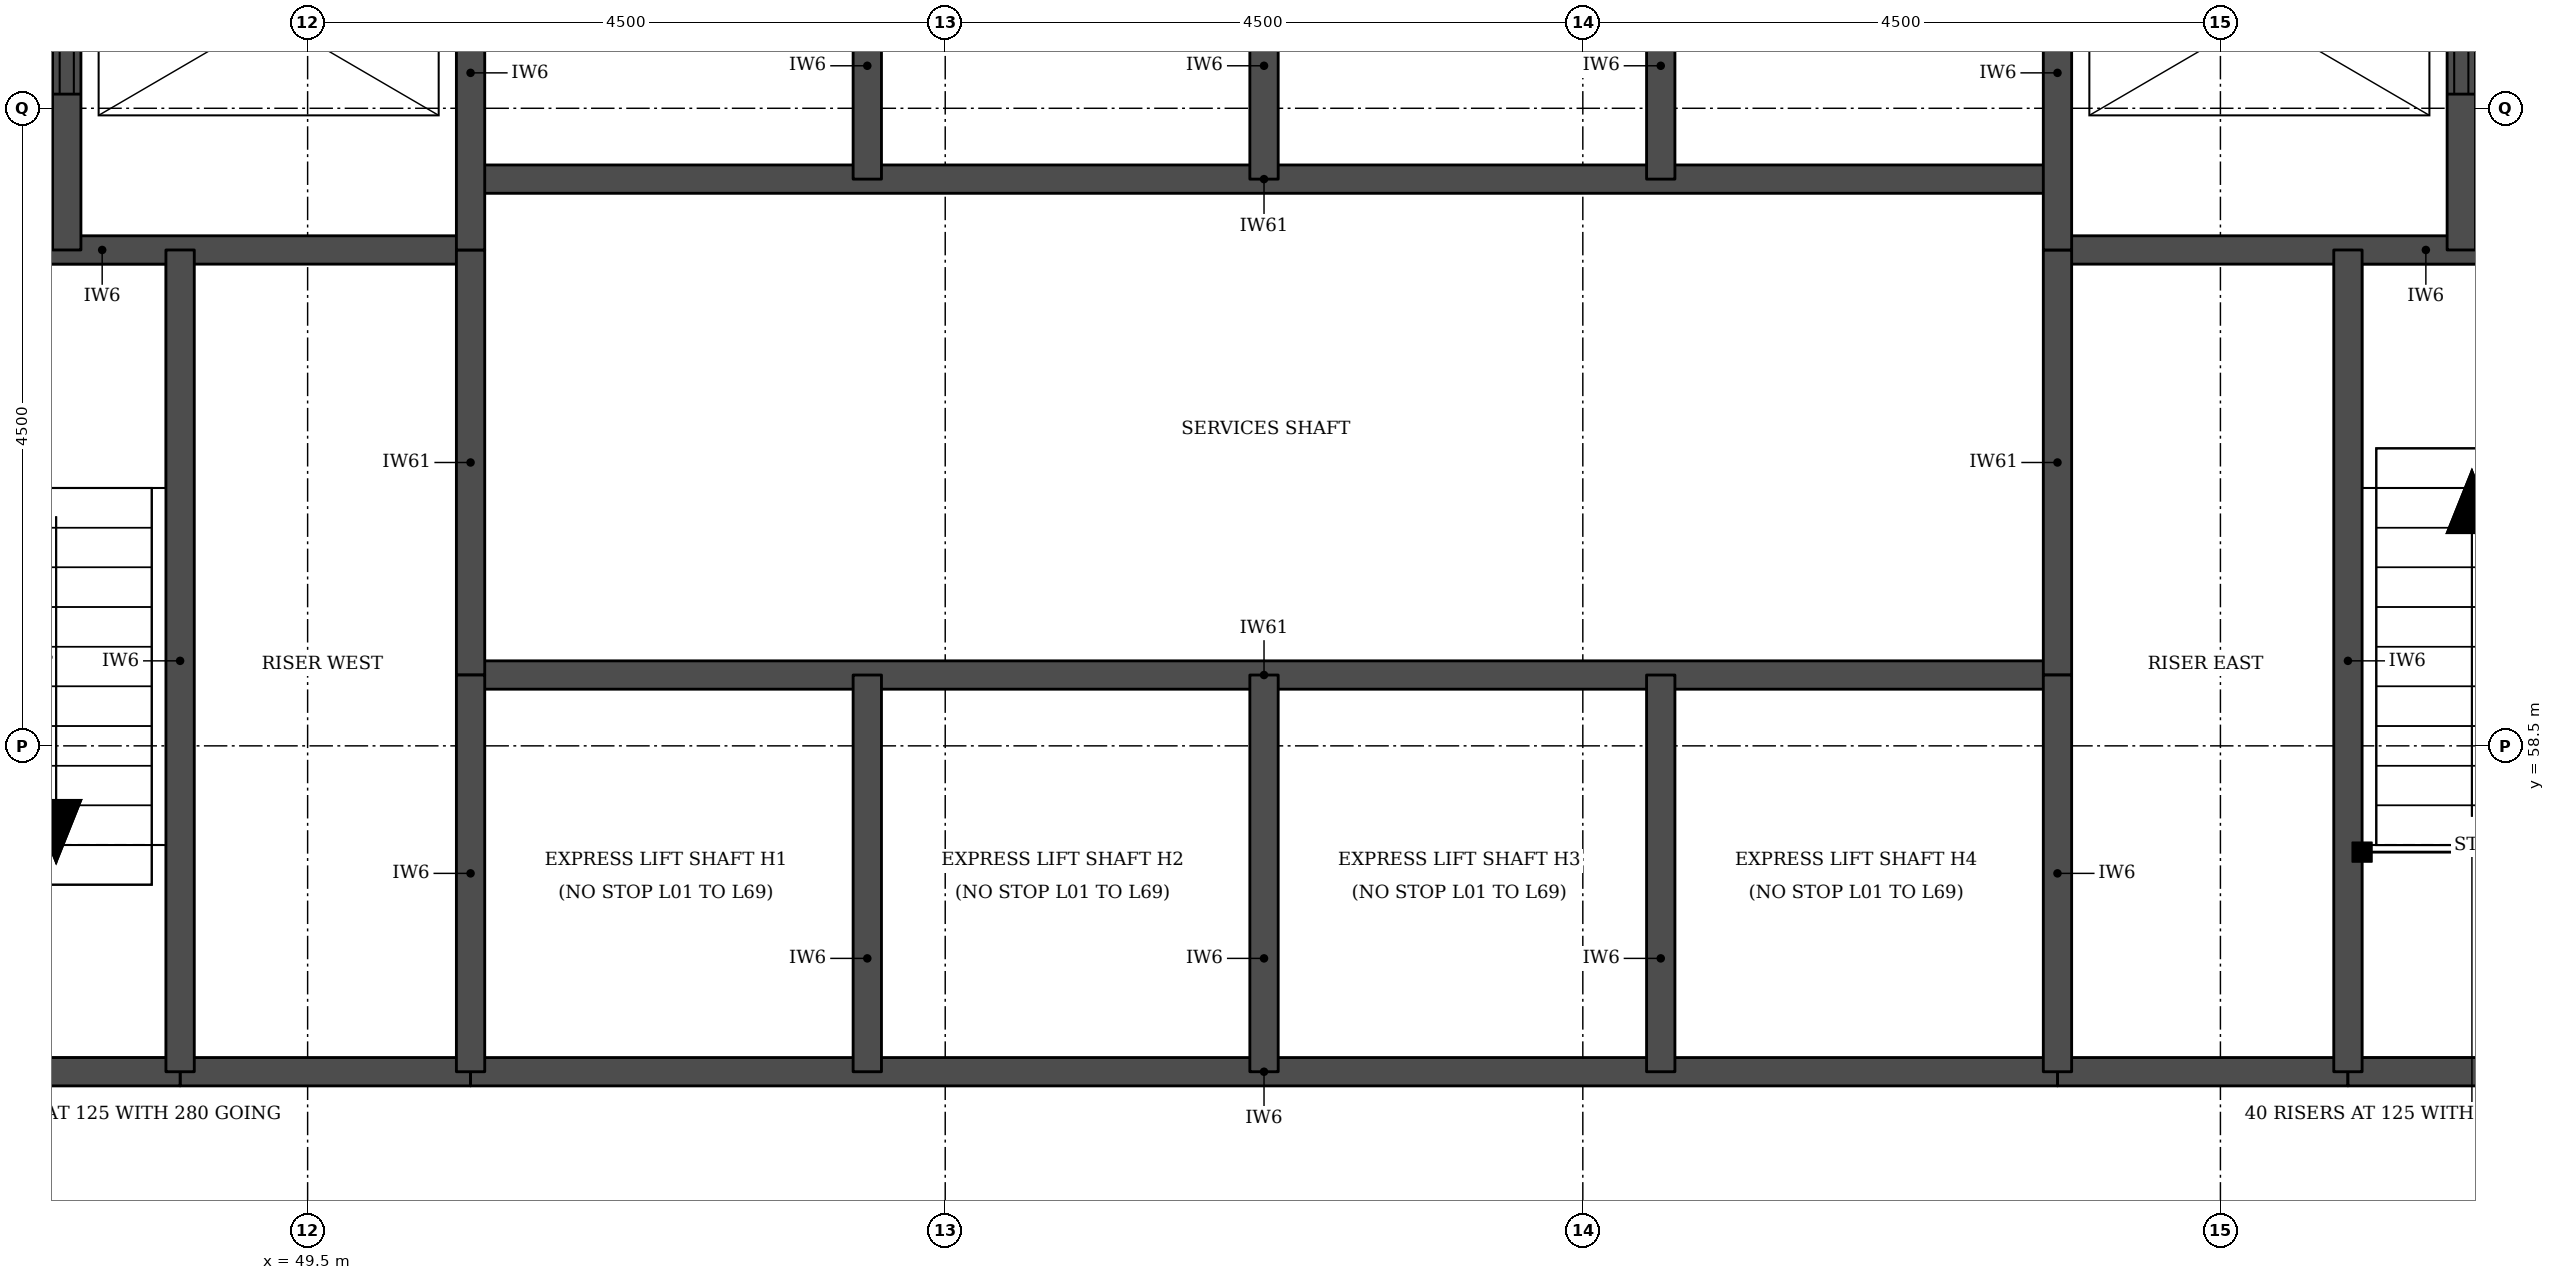
"""IFC4 building model, lengths in metres.
Left out: names, types, materials, properties, quantities, classifications, styles, units other than length and angle.
Written with IfcOpenShell. Run it as: python <this file> out.ifc"""

import sys

from ifc_helpers import new_model, si_unit, direction, frame, frame_2d, origin, place, context, subcontext, project, spatial, rectangle, extrude, element, fill, save


model = new_model("IFC4")
c1 = context("Model", 3, precision=1e-05, world=origin(), true_north=direction((0.0, 1.0)))
c2 = subcontext(c1, "Body", "Model", "MODEL_VIEW")
j1 = project(units=[si_unit("LENGTHUNIT", "METRE"), si_unit("PLANEANGLEUNIT", "RADIAN")], contexts=[c1])
p1 = place(None, origin())
s1 = spatial("IfcSite", under=j1, at=p1, CompositionType="ELEMENT")
p2 = place(p1, origin())
s2 = spatial("IfcBuilding", under=s1, at=p2, CompositionType="ELEMENT")
p3 = place(p2, frame((0.0, 0.0, 138.1)))
s3 = spatial("IfcBuildingStorey", under=s2, at=p3, CompositionType="ELEMENT", Elevation=138.1)
for number, where, z_axis, x_axis in (
    (1, (48.6, 56.2, 0.0), (0.0, 0.0, 1.0), (1.0, 0.0, 0.0)),
    (2, (61.85, 56.2, 0.0), (0.0, 0.0, 1.0), (1.0, 0.0, 0.0)),
):
    element("IfcWall", number, at=place(p3, frame(where, z_axis=z_axis, x_axis=x_axis)), inside=s3, PredefinedType="SOLIDWALL", context=c2, shape_type="SweptSolid", body=[
        extrude(rectangle(XDim=2.05, YDim=0.2, at=frame_2d((1.025, 0.0))), origin(), (0.0, 0.0, 1.0), 4.85),
    ])
p4 = place(p3, frame((45.45, 56.2, 0.0), z_axis=(0.0, 0.0, 1.0), x_axis=(1.0, 0.0, 0.0)))
e3 = element("IfcWall", 3, at=p4, inside=s3, PredefinedType="SOLIDWALL", context=c2, shape_type="SweptSolid", body=[
    extrude(rectangle(XDim=3.15, YDim=0.2, at=frame_2d((1.575, 0.0))), origin(), (0.0, 0.0, 1.0), 4.85),
])
p5 = place(p3, frame((50.65, 56.2, 0.0), z_axis=(0.0, 0.0, 1.0), x_axis=(1.0, 0.0, 0.0)))
e4 = element("IfcWall", 4, at=p5, inside=s3, PredefinedType="SOLIDWALL", context=c2, shape_type="SweptSolid", body=[
    extrude(rectangle(XDim=11.2, YDim=0.2, at=frame_2d((5.6, 0.0))), origin(), (0.0, 0.0, 1.0), 4.85),
])
p6 = place(p3, frame((63.9, 56.2, 0.0), z_axis=(0.0, 0.0, 1.0), x_axis=(1.0, 0.0, 0.0)))
e5 = element("IfcWall", 5, at=p6, inside=s3, PredefinedType="SOLIDWALL", context=c2, shape_type="SweptSolid", body=[
    extrude(rectangle(XDim=3.15, YDim=0.2, at=frame_2d((1.575, 0.0))), origin(), (0.0, 0.0, 1.0), 4.85),
])
p7 = place(p3, frame((50.65, 59.0, 0.0), z_axis=(0.0, 0.0, 1.0), x_axis=(1.0, 0.0, 0.0)))
e6 = element("IfcWall", 6, at=p7, inside=s3, PredefinedType="SOLIDWALL", context=c2, shape_type="SweptSolid", body=[
    extrude(rectangle(XDim=11.2, YDim=0.2, at=frame_2d((5.6, 0.0))), origin(), (0.0, 0.0, 1.0), 5.0),
])
for number, where, z_axis, x_axis in (
    (7, (45.45, 62.0, 0.0), (0.0, 0.0, 1.0), (1.0, 0.0, 0.0)),
    (8, (61.85, 62.0, 0.0), (0.0, 0.0, 1.0), (1.0, 0.0, 0.0)),
):
    element("IfcWall", number, at=place(p3, frame(where, z_axis=z_axis, x_axis=x_axis)), inside=s3, PredefinedType="SOLIDWALL", context=c2, shape_type="SweptSolid", body=[
        extrude(rectangle(XDim=5.2, YDim=0.2, at=frame_2d((2.6, 0.0))), origin(), (0.0, 0.0, 1.0), 4.85),
    ])
p8 = place(p3, frame((50.65, 62.5, 0.0), z_axis=(0.0, 0.0, 1.0), x_axis=(1.0, 0.0, 0.0)))
e9 = element("IfcWall", 9, at=p8, inside=s3, PredefinedType="SOLIDWALL", context=c2, shape_type="SweptSolid", body=[
    extrude(rectangle(XDim=11.2, YDim=0.2, at=frame_2d((5.6, 0.0))), origin(), (0.0, 0.0, 1.0), 5.0),
])
p9 = place(p3, frame((47.8, 62.0, 0.0), z_axis=(0.0, 0.0, 1.0), x_axis=(0.0, 1.0, 0.0)))
e10 = element("IfcWall", 10, at=p9, inside=s3, PredefinedType="SOLIDWALL", context=c2, shape_type="SweptSolid", body=[
    extrude(rectangle(XDim=3.3, YDim=0.2, at=frame_2d((1.65, 0.0))), origin(), (0.0, 0.0, 1.0), 4.85),
])
p10 = place(p9, frame((1.1, 0.0, 0.0)))
e11 = element("IfcOpeningElement", 11, at=p10, cuts=e10, PredefinedType="OPENING", context=c2, shape_type="SweptSolid", body=[
    extrude(rectangle(XDim=1.1, YDim=2.1, at=frame_2d((0.55, 1.05))), frame((0.0, 0.11, 0.0), z_axis=(0.0, -1.0, 0.0), x_axis=(1.0, 0.0, 0.0)), (0.0, 0.0, 1.0), 0.22),
])
p11 = place(p3, frame((48.6, 56.2, 0.0), z_axis=(0.0, 0.0, 1.0), x_axis=(0.0, 1.0, 0.0)))
e12 = element("IfcWall", 12, at=p11, inside=s3, PredefinedType="SOLIDWALL", context=c2, shape_type="SweptSolid", body=[
    extrude(rectangle(XDim=5.8, YDim=0.2, at=frame_2d((2.9, 0.0))), origin(), (0.0, 0.0, 1.0), 4.85),
])
p12 = place(p3, frame((50.65, 59.0, 0.0), z_axis=(0.0, 0.0, 1.0), x_axis=(0.0, 1.0, 0.0)))
e13 = element("IfcWall", 13, at=p12, inside=s3, PredefinedType="SOLIDWALL", context=c2, shape_type="SweptSolid", body=[
    extrude(rectangle(XDim=3.0, YDim=0.2, at=frame_2d((1.5, 0.0))), origin(), (0.0, 0.0, 1.0), 5.0),
])
p13 = place(p3, frame((50.65, 56.2, 0.0), z_axis=(0.0, 0.0, 1.0), x_axis=(0.0, 1.0, 0.0)))
e14 = element("IfcWall", 14, at=p13, inside=s3, PredefinedType="SOLIDWALL", context=c2, shape_type="SweptSolid", body=[
    extrude(rectangle(XDim=2.8, YDim=0.2, at=frame_2d((1.4, 0.0))), origin(), (0.0, 0.0, 1.0), 4.85),
])
p14 = place(p3, frame((50.65, 62.0, 0.0), z_axis=(0.0, 0.0, 1.0), x_axis=(0.0, 1.0, 0.0)))
e15 = element("IfcWall", 15, at=p14, inside=s3, PredefinedType="SOLIDWALL", context=c2, shape_type="SweptSolid", body=[
    extrude(rectangle(XDim=3.3, YDim=0.2, at=frame_2d((1.65, 0.0))), origin(), (0.0, 0.0, 1.0), 4.85),
])
for number, where, z_axis, x_axis in (
    (16, (53.45, 56.2, 0.0), (0.0, 0.0, 1.0), (0.0, 1.0, 0.0)),
    (17, (53.45, 62.5, 0.0), (0.0, 0.0, 1.0), (0.0, 1.0, 0.0)),
    (18, (56.25, 56.2, 0.0), (0.0, 0.0, 1.0), (0.0, 1.0, 0.0)),
    (19, (56.25, 62.5, 0.0), (0.0, 0.0, 1.0), (0.0, 1.0, 0.0)),
    (20, (59.05, 56.2, 0.0), (0.0, 0.0, 1.0), (0.0, 1.0, 0.0)),
    (21, (59.05, 62.5, 0.0), (0.0, 0.0, 1.0), (0.0, 1.0, 0.0)),
):
    element("IfcWall", number, at=place(p3, frame(where, z_axis=z_axis, x_axis=x_axis)), inside=s3, PredefinedType="SOLIDWALL", context=c2, shape_type="SweptSolid", body=[
        extrude(rectangle(XDim=2.8, YDim=0.2, at=frame_2d((1.4, 0.0))), origin(), (0.0, 0.0, 1.0), 4.85),
    ])
p15 = place(p3, frame((61.85, 59.0, 0.0), z_axis=(0.0, 0.0, 1.0), x_axis=(0.0, 1.0, 0.0)))
e22 = element("IfcWall", 22, at=p15, inside=s3, PredefinedType="SOLIDWALL", context=c2, shape_type="SweptSolid", body=[
    extrude(rectangle(XDim=3.0, YDim=0.2, at=frame_2d((1.5, 0.0))), origin(), (0.0, 0.0, 1.0), 5.0),
])
p16 = place(p3, frame((61.85, 56.2, 0.0), z_axis=(0.0, 0.0, 1.0), x_axis=(0.0, 1.0, 0.0)))
e23 = element("IfcWall", 23, at=p16, inside=s3, PredefinedType="SOLIDWALL", context=c2, shape_type="SweptSolid", body=[
    extrude(rectangle(XDim=2.8, YDim=0.2, at=frame_2d((1.4, 0.0))), origin(), (0.0, 0.0, 1.0), 4.85),
])
p17 = place(p3, frame((61.85, 62.0, 0.0), z_axis=(0.0, 0.0, 1.0), x_axis=(0.0, 1.0, 0.0)))
e24 = element("IfcWall", 24, at=p17, inside=s3, PredefinedType="SOLIDWALL", context=c2, shape_type="SweptSolid", body=[
    extrude(rectangle(XDim=3.3, YDim=0.2, at=frame_2d((1.65, 0.0))), origin(), (0.0, 0.0, 1.0), 4.85),
])
p18 = place(p3, frame((63.9, 56.2, 0.0), z_axis=(0.0, 0.0, 1.0), x_axis=(0.0, 1.0, 0.0)))
e25 = element("IfcWall", 25, at=p18, inside=s3, PredefinedType="SOLIDWALL", context=c2, shape_type="SweptSolid", body=[
    extrude(rectangle(XDim=5.8, YDim=0.2, at=frame_2d((2.9, 0.0))), origin(), (0.0, 0.0, 1.0), 4.85),
])
p19 = place(p3, frame((64.7, 62.0, 0.0), z_axis=(0.0, 0.0, 1.0), x_axis=(0.0, 1.0, 0.0)))
e26 = element("IfcWall", 26, at=p19, inside=s3, PredefinedType="SOLIDWALL", context=c2, shape_type="SweptSolid", body=[
    extrude(rectangle(XDim=3.3, YDim=0.2, at=frame_2d((1.65, 0.0))), origin(), (0.0, 0.0, 1.0), 4.85),
])
p20 = place(p19, frame((1.1, 0.0, 0.0)))
e27 = element("IfcOpeningElement", 27, at=p20, cuts=e26, PredefinedType="OPENING", context=c2, shape_type="SweptSolid", body=[
    extrude(rectangle(XDim=1.1, YDim=2.1, at=frame_2d((0.55, 1.05))), frame((0.0, 0.11, 0.0), z_axis=(0.0, -1.0, 0.0), x_axis=(1.0, 0.0, 0.0)), (0.0, 0.0, 1.0), 0.22),
])
p21 = place(p10, origin())
e28 = element("IfcDoor", 28, at=p21, inside=s3, OperationType="DOUBLE_DOOR_SLIDING", PredefinedType="DOOR", context=c2, shape_type="SweptSolid", body=[
    extrude(rectangle(XDim=1.1, YDim=2.1, at=frame_2d((0.55, 1.05))), frame((0.0, 0.025, 0.0), z_axis=(0.0, -1.0, 0.0), x_axis=(1.0, 0.0, 0.0)), (0.0, 0.0, 1.0), 0.05),
])
fill(e11, e28)
p22 = place(p20, origin())
e29 = element("IfcDoor", 29, at=p22, inside=s3, OperationType="DOUBLE_DOOR_SLIDING", PredefinedType="DOOR", context=c2, shape_type="SweptSolid", body=[
    extrude(rectangle(XDim=1.1, YDim=2.1, at=frame_2d((0.55, 1.05))), frame((0.0, 0.025, 0.0), z_axis=(0.0, -1.0, 0.0), x_axis=(1.0, 0.0, 0.0)), (0.0, 0.0, 1.0), 0.05),
])
fill(e27, e29)
save(model, sys.argv[1])
